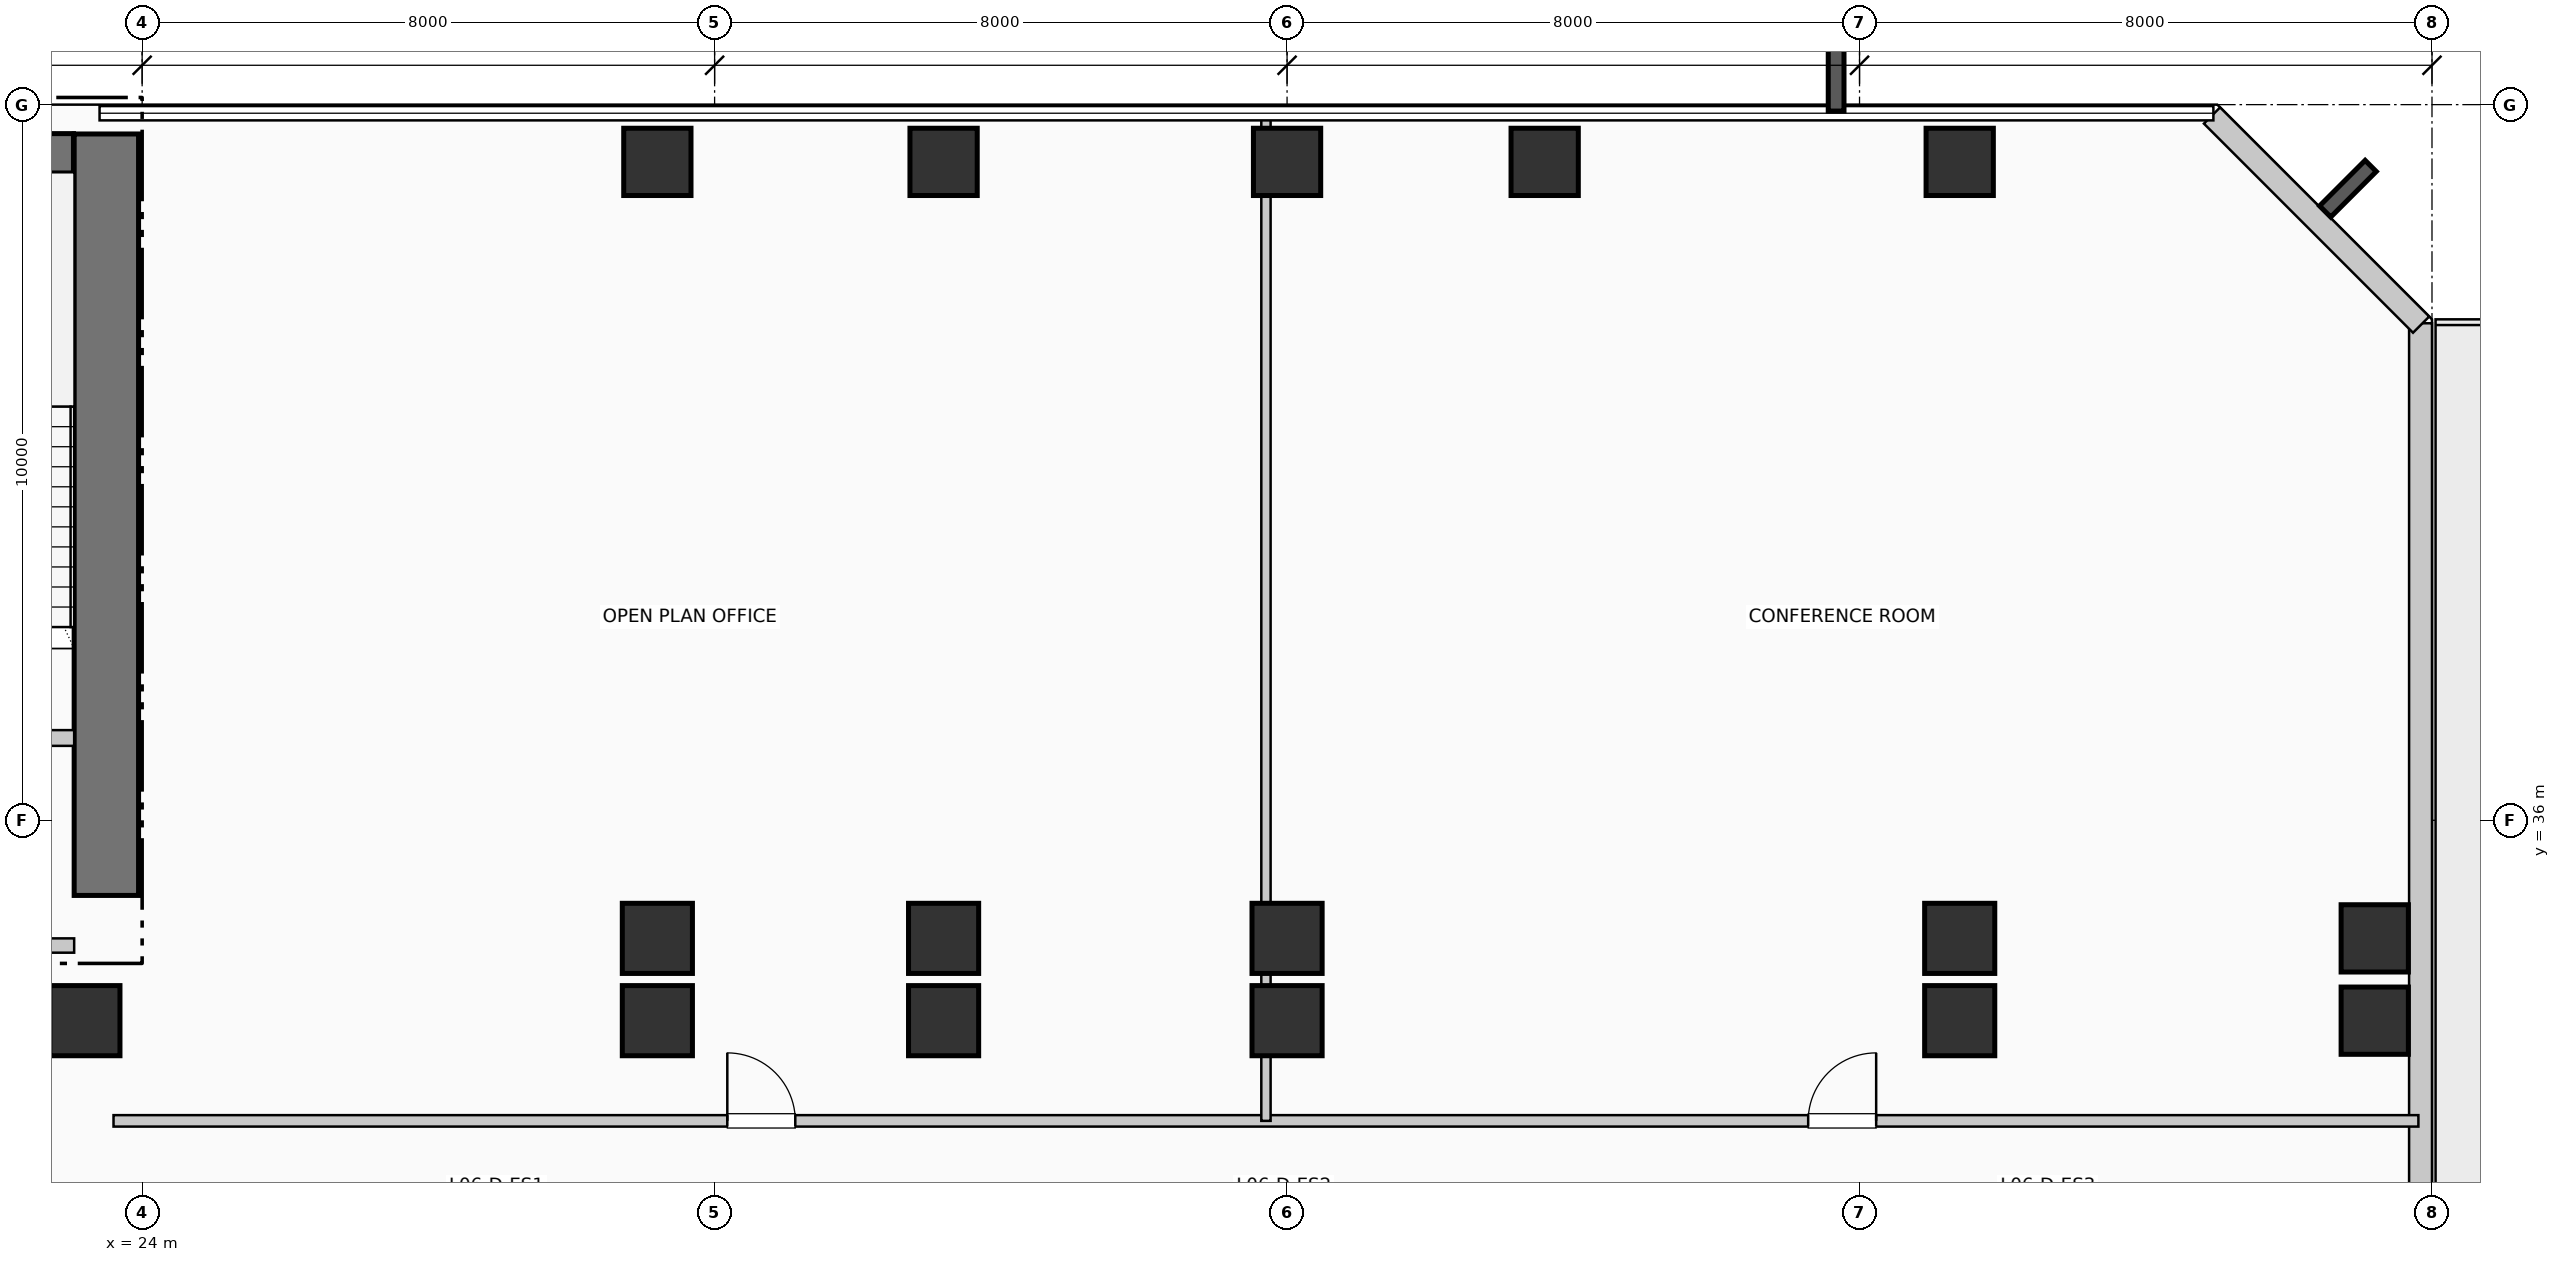
"""IFC4 building model, lengths in metres.
Left out: names, types, materials, properties, quantities, classifications, styles, units other than length and angle.
Written with IfcOpenShell. Run it as: python <this file> out.ifc"""

import sys

from ifc_helpers import new_model, si_unit, direction, frame, frame_2d, origin, origin_2d, place, context, subcontext, project, spatial, rectangle, extrude, element, fill, save


model = new_model("IFC4")
c1 = context("Model", 3, precision=1e-05, world=origin(), true_north=direction((0.0, 1.0)))
c2 = subcontext(c1, "Body", "Model", "MODEL_VIEW")
j1 = project(units=[si_unit("LENGTHUNIT", "METRE"), si_unit("PLANEANGLEUNIT", "RADIAN")], contexts=[c1])
p1 = place(None, origin())
s1 = spatial("IfcSite", under=j1, at=p1, CompositionType="ELEMENT")
p2 = place(p1, origin())
s2 = spatial("IfcBuilding", under=s1, at=p2, CompositionType="ELEMENT")
p3 = place(p2, frame((0.0, 0.0, 30.36)))
s3 = spatial("IfcBuildingStorey", under=s2, at=p3, CompositionType="ELEMENT", Elevation=30.36)
p4 = place(p3, frame((23.5, 34.95, 0.0), z_axis=(0.0, 0.0, 1.0), x_axis=(0.0, 1.0, 0.0)))
e1 = element("IfcWall", 1, at=p4, inside=s3, PredefinedType="SHEAR", context=c2, shape_type="SweptSolid", body=[
    extrude(rectangle(XDim=10.64, YDim=0.9, at=frame_2d((5.32, 0.0))), origin(), (0.0, 0.0, 1.0), 3.96),
])
p5 = place(p3, frame((19.35, 45.32, 0.0), z_axis=(0.0, 0.0, 1.0), x_axis=(1.0, 0.0, 0.0)))
e2 = element("IfcWall", 2, at=p5, inside=s3, PredefinedType="SHEAR", context=c2, shape_type="SweptSolid", body=[
    extrude(rectangle(XDim=3.69, YDim=0.55, at=frame_2d((1.845, 0.0))), origin(), (0.0, 0.0, 1.0), 3.96),
])
p6 = place(p5, frame((1.15, 0.0, 1.05)))
e3 = element("IfcOpeningElement", 3, at=p6, cuts=e2, PredefinedType="OPENING", context=c2, shape_type="SweptSolid", body=[
    extrude(rectangle(XDim=1.4, YDim=1.8, at=frame_2d((0.7, 0.9))), frame((0.0, 0.285, 0.0), z_axis=(0.0, -1.0, 0.0), x_axis=(1.0, 0.0, 0.0)), (0.0, 0.0, 1.0), 0.57),
])
for number, where, z_axis, x_axis in (
    (4, (23.2, 33.2, 0.0), (0.0, 0.0, 1.0), (1.0, 0.0, 0.0)),
    (5, (31.2, 33.2, 0.0), (0.0, 0.0, 1.0), (1.0, 0.0, 0.0)),
    (6, (31.2, 34.35, 0.0), (0.0, 0.0, 1.0), (1.0, 0.0, 0.0)),
):
    element("IfcColumn", number, at=place(p3, frame(where, z_axis=z_axis, x_axis=x_axis)), inside=s3, PredefinedType="COLUMN", context=c2, shape_type="SweptSolid", body=[
        extrude(rectangle(XDim=0.98, YDim=0.98, at=origin_2d()), origin(), (0.0, 0.0, 1.0), 3.96),
    ])
p7 = place(p3, frame((31.2, 45.2, 0.0), z_axis=(0.0, 0.0, 1.0), x_axis=(1.0, 0.0, 0.0)))
e7 = element("IfcColumn", 7, at=p7, inside=s3, PredefinedType="COLUMN", context=c2, shape_type="SweptSolid", body=[
    extrude(rectangle(XDim=0.94, YDim=0.94, at=origin_2d()), origin(), (0.0, 0.0, 1.0), 3.96),
])
for number, where, z_axis, x_axis in (
    (8, (35.2, 33.2, 0.0), (0.0, 0.0, 1.0), (1.0, 0.0, 0.0)),
    (9, (35.2, 34.35, 0.0), (0.0, 0.0, 1.0), (1.0, 0.0, 0.0)),
):
    element("IfcColumn", number, at=place(p3, frame(where, z_axis=z_axis, x_axis=x_axis)), inside=s3, PredefinedType="COLUMN", context=c2, shape_type="SweptSolid", body=[
        extrude(rectangle(XDim=0.98, YDim=0.98, at=origin_2d()), origin(), (0.0, 0.0, 1.0), 3.96),
    ])
p8 = place(p3, frame((35.2, 45.2, 0.0), z_axis=(0.0, 0.0, 1.0), x_axis=(1.0, 0.0, 0.0)))
e10 = element("IfcColumn", 10, at=p8, inside=s3, PredefinedType="COLUMN", context=c2, shape_type="SweptSolid", body=[
    extrude(rectangle(XDim=0.94, YDim=0.94, at=origin_2d()), origin(), (0.0, 0.0, 1.0), 3.96),
])
for number, where, z_axis, x_axis in (
    (11, (40.0, 33.2, 0.0), (0.0, 0.0, 1.0), (1.0, 0.0, 0.0)),
    (12, (40.0, 34.35, 0.0), (0.0, 0.0, 1.0), (1.0, 0.0, 0.0)),
):
    element("IfcColumn", number, at=place(p3, frame(where, z_axis=z_axis, x_axis=x_axis)), inside=s3, PredefinedType="COLUMN", context=c2, shape_type="SweptSolid", body=[
        extrude(rectangle(XDim=0.98, YDim=0.98, at=origin_2d()), origin(), (0.0, 0.0, 1.0), 3.96),
    ])
for number, where, z_axis, x_axis in (
    (13, (40.0, 45.2, 0.0), (0.0, 0.0, 1.0), (1.0, 0.0, 0.0)),
    (14, (43.6, 45.2, 0.0), (0.0, 0.0, 1.0), (1.0, 0.0, 0.0)),
):
    element("IfcColumn", number, at=place(p3, frame(where, z_axis=z_axis, x_axis=x_axis)), inside=s3, PredefinedType="COLUMN", context=c2, shape_type="SweptSolid", body=[
        extrude(rectangle(XDim=0.94, YDim=0.94, at=origin_2d()), origin(), (0.0, 0.0, 1.0), 3.96),
    ])
for number, where, z_axis, x_axis in (
    (15, (49.4, 33.2, 0.0), (0.0, 0.0, 1.0), (1.0, 0.0, 0.0)),
    (16, (49.4, 34.35, 0.0), (0.0, 0.0, 1.0), (1.0, 0.0, 0.0)),
):
    element("IfcColumn", number, at=place(p3, frame(where, z_axis=z_axis, x_axis=x_axis)), inside=s3, PredefinedType="COLUMN", context=c2, shape_type="SweptSolid", body=[
        extrude(rectangle(XDim=0.98, YDim=0.98, at=origin_2d()), origin(), (0.0, 0.0, 1.0), 3.96),
    ])
for number, where, z_axis, x_axis in (
    (17, (49.4, 45.2, 0.0), (0.0, 0.0, 1.0), (1.0, 0.0, 0.0)),
    (18, (55.2, 33.2, 0.0), (0.0, 0.0, 1.0), (1.0, 0.0, 0.0)),
    (19, (55.2, 34.35, 0.0), (0.0, 0.0, 1.0), (1.0, 0.0, 0.0)),
):
    element("IfcColumn", number, at=place(p3, frame(where, z_axis=z_axis, x_axis=x_axis)), inside=s3, PredefinedType="COLUMN", context=c2, shape_type="SweptSolid", body=[
        extrude(rectangle(XDim=0.94, YDim=0.94, at=origin_2d()), origin(), (0.0, 0.0, 1.0), 3.96),
    ])
p9 = place(p3, frame((55.84, 21.055, 0.0), z_axis=(0.0, 0.0, 1.0), x_axis=(0.0, 1.0, 0.0)))
e20 = element("IfcWall", 20, at=p9, inside=s3, PredefinedType="SOLIDWALL", context=c2, shape_type="SweptSolid", body=[
    extrude(rectangle(XDim=21.89, YDim=0.32, at=frame_2d((10.945, 0.0))), origin(), (0.0, 0.0, 1.0), 3.71),
])
p10 = place(p9, frame((6.629, 0.0, 0.0), z_axis=(0.0, 0.0, 1.0), x_axis=(-1.0, 0.0, 0.0)))
e21 = element("IfcOpeningElement", 21, at=p10, cuts=e20, PredefinedType="OPENING", context=c2, shape_type="SweptSolid", body=[
    extrude(rectangle(XDim=1.1, YDim=2.2, at=frame_2d((0.55, 1.1))), frame((0.0, 0.17, 0.0), z_axis=(0.0, -1.0, 0.0), x_axis=(1.0, 0.0, 0.0)), (0.0, 0.0, 1.0), 0.34),
])
p11 = place(p3, frame((55.848, 42.926, 0.0), z_axis=(0.0, 0.0, 1.0), x_axis=(-0.707106781187, 0.707106781187, 0.0)))
e22 = element("IfcWall", 22, at=p11, inside=s3, PredefinedType="SOLIDWALL", context=c2, shape_type="SweptSolid", body=[
    extrude(rectangle(XDim=4.133, YDim=0.32, at=frame_2d((2.066, 0.0))), origin(), (0.0, 0.0, 1.0), 3.71),
])
p12 = place(p3, frame((19.9, 37.15, 0.0), z_axis=(0.0, 0.0, 1.0), x_axis=(1.0, 0.0, 0.0)))
e23 = element("IfcWall", 23, at=p12, inside=s3, PredefinedType="PARTITIONING", context=c2, shape_type="SweptSolid", body=[
    extrude(rectangle(XDim=3.15, YDim=0.22, at=frame_2d((1.575, 0.0))), origin(), (0.0, 0.0, 1.0), 3.71),
])
p13 = place(p12, frame((2.05, 0.0, 0.0), z_axis=(0.0, 0.0, 1.0), x_axis=(-1.0, 0.0, 0.0)))
e24 = element("IfcOpeningElement", 24, at=p13, cuts=e23, PredefinedType="OPENING", context=c2, shape_type="SweptSolid", body=[
    extrude(rectangle(XDim=1.05, YDim=2.15, at=frame_2d((0.525, 1.075))), frame((0.0, 0.12, 0.0), z_axis=(0.0, -1.0, 0.0), x_axis=(1.0, 0.0, 0.0)), (0.0, 0.0, 1.0), 0.24),
])
p14 = place(p3, frame((19.8, 34.25, 0.0), z_axis=(0.0, 0.0, 1.0), x_axis=(1.0, 0.0, 0.0)))
e25 = element("IfcWall", 25, at=p14, inside=s3, PredefinedType="PARTITIONING", context=c2, shape_type="SweptSolid", body=[
    extrude(rectangle(XDim=3.25, YDim=0.2, at=frame_2d((1.625, 0.0))), origin(), (0.0, 0.0, 1.0), 3.71),
])
p15 = place(p14, frame((2.15, 0.0, 0.0), z_axis=(0.0, 0.0, 1.0), x_axis=(-1.0, 0.0, 0.0)))
e26 = element("IfcOpeningElement", 26, at=p15, cuts=e25, PredefinedType="OPENING", context=c2, shape_type="SweptSolid", body=[
    extrude(rectangle(XDim=1.1, YDim=2.15, at=frame_2d((0.55, 1.075))), frame((0.0, 0.11, 0.0), z_axis=(0.0, -1.0, 0.0), x_axis=(1.0, 0.0, 0.0)), (0.0, 0.0, 1.0), 0.22),
])
p16 = place(p3, frame((23.6, 31.8, 0.0), z_axis=(0.0, 0.0, 1.0), x_axis=(1.0, 0.0, 0.0)))
e27 = element("IfcWall", 27, at=p16, inside=s3, PredefinedType="PARTITIONING", context=c2, shape_type="SweptSolid", body=[
    extrude(rectangle(XDim=32.21, YDim=0.16, at=frame_2d((16.105, 0.0))), origin(), (0.0, 0.0, 1.0), 3.71),
])
p17 = place(p16, frame((8.577, 0.0, 0.0)))
e28 = element("IfcOpeningElement", 28, at=p17, cuts=e27, PredefinedType="OPENING", context=c2, shape_type="SweptSolid", body=[
    extrude(rectangle(XDim=0.95, YDim=2.15, at=frame_2d((0.475, 1.075))), frame((0.0, 0.09, 0.0), z_axis=(0.0, -1.0, 0.0), x_axis=(1.0, 0.0, 0.0)), (0.0, 0.0, 1.0), 0.18),
])
p18 = place(p16, frame((23.683, 0.0, 0.0)))
e29 = element("IfcOpeningElement", 29, at=p18, cuts=e27, PredefinedType="OPENING", context=c2, shape_type="SweptSolid", body=[
    extrude(rectangle(XDim=0.95, YDim=2.15, at=frame_2d((0.475, 1.075))), frame((0.0, 0.09, 0.0), z_axis=(0.0, -1.0, 0.0), x_axis=(1.0, 0.0, 0.0)), (0.0, 0.0, 1.0), 0.18),
])
p19 = place(p3, frame((39.705, 31.8, 0.0), z_axis=(0.0, 0.0, 1.0), x_axis=(0.0, 1.0, 0.0)))
e30 = element("IfcWall", 30, at=p19, inside=s3, PredefinedType="PARTITIONING", context=c2, shape_type="SweptSolid", body=[
    extrude(rectangle(XDim=14.01, YDim=0.13, at=frame_2d((7.005, 0.0))), origin(), (0.0, 0.0, 1.0), 2.995),
])
p20 = place(p17, origin())
e31 = element("IfcDoor", 31, at=p20, inside=s3, OperationType="SINGLE_SWING_LEFT", PredefinedType="DOOR", context=c2, shape_type="SweptSolid", body=[
    extrude(rectangle(XDim=0.95, YDim=2.15, at=frame_2d((0.475, 1.075))), frame((0.0, 0.025, 0.0), z_axis=(0.0, -1.0, 0.0), x_axis=(1.0, 0.0, 0.0)), (0.0, 0.0, 1.0), 0.05),
])
fill(e28, e31)
p21 = place(p18, origin())
e32 = element("IfcDoor", 32, at=p21, inside=s3, OperationType="SINGLE_SWING_RIGHT", PredefinedType="DOOR", context=c2, shape_type="SweptSolid", body=[
    extrude(rectangle(XDim=0.95, YDim=2.15, at=frame_2d((0.475, 1.075))), frame((0.0, 0.025, 0.0), z_axis=(0.0, -1.0, 0.0), x_axis=(1.0, 0.0, 0.0)), (0.0, 0.0, 1.0), 0.05),
])
fill(e29, e32)
save(model, sys.argv[1])
